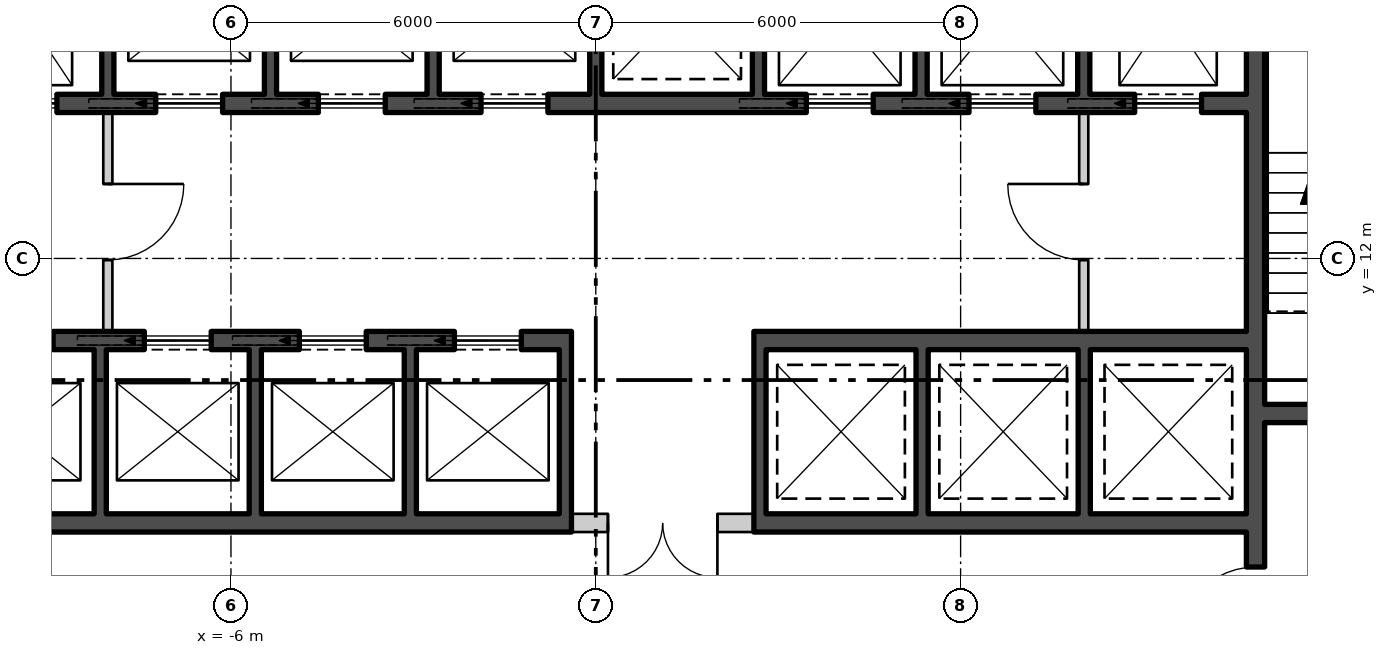
"""IFC4 building model, lengths in metres.
Left out: names, types, materials, properties, quantities, classifications, styles, units other than length and angle.
Written with IfcOpenShell. Run it as: python <this file> out.ifc"""

import sys

from ifc_helpers import new_model, si_unit, direction, frame, frame_2d, origin, place, context, subcontext, project, spatial, rectangle, extrude, element, fill, save


model = new_model("IFC4")
c1 = context("Model", 3, precision=1e-05, world=origin(), true_north=direction((0.0, 1.0)))
c2 = subcontext(c1, "Body", "Model", "MODEL_VIEW")
j1 = project(units=[si_unit("LENGTHUNIT", "METRE"), si_unit("PLANEANGLEUNIT", "RADIAN")], contexts=[c1])
p1 = place(None, origin())
s1 = spatial("IfcSite", under=j1, at=p1, CompositionType="ELEMENT")
p2 = place(p1, origin())
s2 = spatial("IfcBuilding", under=s1, at=p2, CompositionType="ELEMENT")
p3 = place(p2, frame((0.0, 0.0, 13.5)))
s3 = spatial("IfcBuildingStorey", under=s2, at=p3, CompositionType="ELEMENT", Elevation=13.5)
p4 = place(p3, frame((10.85, 0.6, 0.0), z_axis=(0.0, 0.0, 1.0), x_axis=(0.0, 1.0, 0.0)))
e1 = element("IfcWall", 1, at=p4, inside=s3, PredefinedType="SHEAR", context=c2, shape_type="SweptSolid", body=[
    extrude(rectangle(XDim=16.8, YDim=0.3, at=frame_2d((8.4, 0.0))), origin(), (0.0, 0.0, 1.0), 4.88),
])
p5 = place(p4, frame((5.075, 0.0, 0.0)))
e2 = element("IfcOpeningElement", 2, at=p5, cuts=e1, PredefinedType="OPENING", context=c2, shape_type="SweptSolid", body=[
    extrude(rectangle(XDim=1.25, YDim=2.1, at=frame_2d((0.625, 1.05))), frame((0.0, 0.16, 0.0), z_axis=(0.0, -1.0, 0.0), x_axis=(1.0, 0.0, 0.0)), (0.0, 0.0, 1.0), 0.32),
])
p6 = place(p4, frame((1.525, 0.0, 0.0)))
e3 = element("IfcOpeningElement", 3, at=p6, cuts=e1, PredefinedType="OPENING", context=c2, shape_type="SweptSolid", body=[
    extrude(rectangle(XDim=1.0, YDim=2.1, at=frame_2d((0.5, 1.05))), frame((0.0, 0.16, 0.0), z_axis=(0.0, -1.0, 0.0), x_axis=(1.0, 0.0, 0.0)), (0.0, 0.0, 1.0), 0.32),
])
p7 = place(p3, frame((11.0, 9.45, 0.0), z_axis=(0.0, 0.0, 1.0), x_axis=(1.0, 0.0, 0.0)))
e4 = element("IfcWall", 4, at=p7, inside=s3, PredefinedType="SHEAR", context=c2, shape_type="SweptSolid", body=[
    extrude(rectangle(XDim=3.2, YDim=0.3, at=frame_2d((1.6, 0.0))), origin(), (0.0, 0.0, 1.0), 4.88),
])
p8 = place(p7, frame((1.0, 0.0, 0.0)))
e5 = element("IfcOpeningElement", 5, at=p8, cuts=e4, PredefinedType="OPENING", context=c2, shape_type="SweptSolid", body=[
    extrude(rectangle(XDim=1.2, YDim=2.1, at=frame_2d((0.6, 1.05))), frame((0.0, 0.16, 0.0), z_axis=(0.0, -1.0, 0.0), x_axis=(1.0, 0.0, 0.0)), (0.0, 0.0, 1.0), 0.32),
])
p9 = place(p3, frame((-10.7, 14.55, 0.0), z_axis=(0.0, 0.0, 1.0), x_axis=(1.0, 0.0, 0.0)))
e6 = element("IfcWall", 6, at=p9, inside=s3, PredefinedType="SHEAR", context=c2, shape_type="SweptSolid", body=[
    extrude(rectangle(XDim=21.4, YDim=0.3, at=frame_2d((10.7, 0.0))), origin(), (0.0, 0.0, 1.0), 4.88),
])
p10 = place(p9, frame((0.738, 0.0, 0.0)))
e7 = element("IfcOpeningElement", 7, at=p10, cuts=e6, PredefinedType="OPENING", context=c2, shape_type="SweptSolid", body=[
    extrude(rectangle(XDim=1.1, YDim=2.1, at=frame_2d((0.55, 1.05))), frame((0.0, 0.16, 0.0), z_axis=(0.0, -1.0, 0.0), x_axis=(1.0, 0.0, 0.0)), (0.0, 0.0, 1.0), 0.32),
])
p11 = place(p9, frame((3.462, 0.0, 0.0)))
e8 = element("IfcOpeningElement", 8, at=p11, cuts=e6, PredefinedType="OPENING", context=c2, shape_type="SweptSolid", body=[
    extrude(rectangle(XDim=1.1, YDim=2.1, at=frame_2d((0.55, 1.05))), frame((0.0, 0.16, 0.0), z_axis=(0.0, -1.0, 0.0), x_axis=(1.0, 0.0, 0.0)), (0.0, 0.0, 1.0), 0.32),
])
p12 = place(p9, frame((6.138, 0.0, 0.0)))
e9 = element("IfcOpeningElement", 9, at=p12, cuts=e6, PredefinedType="OPENING", context=c2, shape_type="SweptSolid", body=[
    extrude(rectangle(XDim=1.1, YDim=2.1, at=frame_2d((0.55, 1.05))), frame((0.0, 0.16, 0.0), z_axis=(0.0, -1.0, 0.0), x_axis=(1.0, 0.0, 0.0)), (0.0, 0.0, 1.0), 0.32),
])
p13 = place(p9, frame((8.812, 0.0, 0.0)))
e10 = element("IfcOpeningElement", 10, at=p13, cuts=e6, PredefinedType="OPENING", context=c2, shape_type="SweptSolid", body=[
    extrude(rectangle(XDim=1.1, YDim=2.1, at=frame_2d((0.55, 1.05))), frame((0.0, 0.16, 0.0), z_axis=(0.0, -1.0, 0.0), x_axis=(1.0, 0.0, 0.0)), (0.0, 0.0, 1.0), 0.32),
])
p14 = place(p9, frame((14.162, 0.0, 0.0)))
e11 = element("IfcOpeningElement", 11, at=p14, cuts=e6, PredefinedType="OPENING", context=c2, shape_type="SweptSolid", body=[
    extrude(rectangle(XDim=1.1, YDim=2.1, at=frame_2d((0.55, 1.05))), frame((0.0, 0.16, 0.0), z_axis=(0.0, -1.0, 0.0), x_axis=(1.0, 0.0, 0.0)), (0.0, 0.0, 1.0), 0.32),
])
p15 = place(p9, frame((16.837, 0.0, 0.0)))
e12 = element("IfcOpeningElement", 12, at=p15, cuts=e6, PredefinedType="OPENING", context=c2, shape_type="SweptSolid", body=[
    extrude(rectangle(XDim=1.1, YDim=2.1, at=frame_2d((0.55, 1.05))), frame((0.0, 0.16, 0.0), z_axis=(0.0, -1.0, 0.0), x_axis=(1.0, 0.0, 0.0)), (0.0, 0.0, 1.0), 0.32),
])
p16 = place(p9, frame((19.562, 0.0, 0.0)))
e13 = element("IfcOpeningElement", 13, at=p16, cuts=e6, PredefinedType="OPENING", context=c2, shape_type="SweptSolid", body=[
    extrude(rectangle(XDim=1.1, YDim=2.1, at=frame_2d((0.55, 1.05))), frame((0.0, 0.16, 0.0), z_axis=(0.0, -1.0, 0.0), x_axis=(1.0, 0.0, 0.0)), (0.0, 0.0, 1.0), 0.32),
])
p17 = place(p3, frame((-10.7, 10.65, 0.0), z_axis=(0.0, 0.0, 1.0), x_axis=(1.0, 0.0, 0.0)))
e14 = element("IfcWall", 14, at=p17, inside=s3, PredefinedType="SHEAR", context=c2, shape_type="SweptSolid", body=[
    extrude(rectangle(XDim=10.3, YDim=0.3, at=frame_2d((5.15, 0.0))), origin(), (0.0, 0.0, 1.0), 4.88),
])
p18 = place(p17, frame((0.675, 0.0, 0.0)))
e15 = element("IfcOpeningElement", 15, at=p18, cuts=e14, PredefinedType="OPENING", context=c2, shape_type="SweptSolid", body=[
    extrude(rectangle(XDim=1.1, YDim=2.1, at=frame_2d((0.55, 1.05))), frame((0.0, 0.16, 0.0), z_axis=(0.0, -1.0, 0.0), x_axis=(1.0, 0.0, 0.0)), (0.0, 0.0, 1.0), 0.32),
])
p19 = place(p17, frame((3.275, 0.0, 0.0)))
e16 = element("IfcOpeningElement", 16, at=p19, cuts=e14, PredefinedType="OPENING", context=c2, shape_type="SweptSolid", body=[
    extrude(rectangle(XDim=1.1, YDim=2.1, at=frame_2d((0.55, 1.05))), frame((0.0, 0.16, 0.0), z_axis=(0.0, -1.0, 0.0), x_axis=(1.0, 0.0, 0.0)), (0.0, 0.0, 1.0), 0.32),
])
p20 = place(p17, frame((5.825, 0.0, 0.0)))
e17 = element("IfcOpeningElement", 17, at=p20, cuts=e14, PredefinedType="OPENING", context=c2, shape_type="SweptSolid", body=[
    extrude(rectangle(XDim=1.1, YDim=2.1, at=frame_2d((0.55, 1.05))), frame((0.0, 0.16, 0.0), z_axis=(0.0, -1.0, 0.0), x_axis=(1.0, 0.0, 0.0)), (0.0, 0.0, 1.0), 0.32),
])
p21 = place(p17, frame((8.375, 0.0, 0.0)))
e18 = element("IfcOpeningElement", 18, at=p21, cuts=e14, PredefinedType="OPENING", context=c2, shape_type="SweptSolid", body=[
    extrude(rectangle(XDim=1.1, YDim=2.1, at=frame_2d((0.55, 1.05))), frame((0.0, 0.16, 0.0), z_axis=(0.0, -1.0, 0.0), x_axis=(1.0, 0.0, 0.0)), (0.0, 0.0, 1.0), 0.32),
])
p22 = place(p3, frame((-10.7, 7.65, 0.0), z_axis=(0.0, 0.0, 1.0), x_axis=(1.0, 0.0, 0.0)))
e19 = element("IfcWall", 19, at=p22, inside=s3, PredefinedType="SHEAR", context=c2, shape_type="SweptSolid", body=[
    extrude(rectangle(XDim=10.3, YDim=0.3, at=frame_2d((5.15, 0.0))), origin(), (0.0, 0.0, 1.0), 4.88),
])
for number, where, z_axis, x_axis in (
    (20, (2.6, 10.65, 0.0), (0.0, 0.0, 1.0), (1.0, 0.0, 0.0)),
    (21, (2.6, 7.65, 0.0), (0.0, 0.0, 1.0), (1.0, 0.0, 0.0)),
):
    element("IfcWall", number, at=place(p3, frame(where, z_axis=z_axis, x_axis=x_axis)), inside=s3, PredefinedType="SHEAR", context=c2, shape_type="SweptSolid", body=[
        extrude(rectangle(XDim=8.1, YDim=0.3, at=frame_2d((4.05, 0.0))), origin(), (0.0, 0.0, 1.0), 4.88),
    ])
for number, where, z_axis, x_axis in (
    (22, (-8.025, 14.7, 0.0), (0.0, 0.0, 1.0), (0.0, 1.0, 0.0)),
    (23, (-5.35, 14.7, 0.0), (0.0, 0.0, 1.0), (0.0, 1.0, 0.0)),
    (24, (-2.675, 14.7, 0.0), (0.0, 0.0, 1.0), (0.0, 1.0, 0.0)),
    (25, (0.0, 14.7, 0.0), (0.0, 0.0, 1.0), (0.0, 1.0, 0.0)),
    (26, (2.675, 14.7, 0.0), (0.0, 0.0, 1.0), (0.0, 1.0, 0.0)),
    (27, (5.35, 14.7, 0.0), (0.0, 0.0, 1.0), (0.0, 1.0, 0.0)),
    (28, (8.025, 14.7, 0.0), (0.0, 0.0, 1.0), (0.0, 1.0, 0.0)),
    (29, (-8.15, 7.8, 0.0), (0.0, 0.0, 1.0), (0.0, 1.0, 0.0)),
    (30, (-5.6, 7.8, 0.0), (0.0, 0.0, 1.0), (0.0, 1.0, 0.0)),
    (31, (-3.05, 7.8, 0.0), (0.0, 0.0, 1.0), (0.0, 1.0, 0.0)),
    (32, (-0.5, 7.8, 0.0), (0.0, 0.0, 1.0), (0.0, 1.0, 0.0)),
    (33, (2.7, 7.8, 0.0), (0.0, 0.0, 1.0), (0.0, 1.0, 0.0)),
    (34, (5.367, 7.8, 0.0), (0.0, 0.0, 1.0), (0.0, 1.0, 0.0)),
    (35, (8.033, 7.8, 0.0), (0.0, 0.0, 1.0), (0.0, 1.0, 0.0)),
):
    element("IfcWall", number, at=place(p3, frame(where, z_axis=z_axis, x_axis=x_axis)), inside=s3, PredefinedType="SHEAR", context=c2, shape_type="SweptSolid", body=[
        extrude(rectangle(XDim=2.7, YDim=0.2, at=frame_2d((1.35, 0.0))), origin(), (0.0, 0.0, 1.0), 4.88),
    ])
p23 = place(p3, frame((-8.025, 10.8, 0.0), z_axis=(0.0, 0.0, 1.0), x_axis=(0.0, 1.0, 0.0)))
e36 = element("IfcWall", 36, at=p23, inside=s3, PredefinedType="PARTITIONING", context=c2, shape_type="SweptSolid", body=[
    extrude(rectangle(XDim=3.6, YDim=0.15, at=frame_2d((1.8, 0.0))), origin(), (0.0, 0.0, 1.0), 4.88),
])
p24 = place(p23, frame((1.175, 0.0, 0.0)))
e37 = element("IfcOpeningElement", 37, at=p24, cuts=e36, PredefinedType="OPENING", context=c2, shape_type="SweptSolid", body=[
    extrude(rectangle(XDim=1.25, YDim=2.1, at=frame_2d((0.625, 1.05))), frame((0.0, 0.085, 0.0), z_axis=(0.0, -1.0, 0.0), x_axis=(1.0, 0.0, 0.0)), (0.0, 0.0, 1.0), 0.17),
])
p25 = place(p3, frame((8.025, 10.8, 0.0), z_axis=(0.0, 0.0, 1.0), x_axis=(0.0, 1.0, 0.0)))
e38 = element("IfcWall", 38, at=p25, inside=s3, PredefinedType="PARTITIONING", context=c2, shape_type="SweptSolid", body=[
    extrude(rectangle(XDim=3.6, YDim=0.15, at=frame_2d((1.8, 0.0))), origin(), (0.0, 0.0, 1.0), 4.88),
])
p26 = place(p25, frame((1.175, 0.0, 0.0)))
e39 = element("IfcOpeningElement", 39, at=p26, cuts=e38, PredefinedType="OPENING", context=c2, shape_type="SweptSolid", body=[
    extrude(rectangle(XDim=1.25, YDim=2.1, at=frame_2d((0.625, 1.05))), frame((0.0, 0.085, 0.0), z_axis=(0.0, -1.0, 0.0), x_axis=(1.0, 0.0, 0.0)), (0.0, 0.0, 1.0), 0.17),
])
p27 = place(p3, frame((-0.4, 7.65, 0.0), z_axis=(0.0, 0.0, 1.0), x_axis=(1.0, 0.0, 0.0)))
e40 = element("IfcWall", 40, at=p27, inside=s3, PredefinedType="PARTITIONING", context=c2, shape_type="SweptSolid", body=[
    extrude(rectangle(XDim=3.0, YDim=0.3, at=frame_2d((1.5, 0.0))), origin(), (0.0, 0.0, 1.0), 4.88),
])
p28 = place(p27, frame((0.6, 0.0, 0.0)))
e41 = element("IfcOpeningElement", 41, at=p28, cuts=e40, PredefinedType="OPENING", context=c2, shape_type="SweptSolid", body=[
    extrude(rectangle(XDim=1.8, YDim=2.4, at=frame_2d((0.9, 1.2))), frame((0.0, 0.16, 0.0), z_axis=(0.0, -1.0, 0.0), x_axis=(1.0, 0.0, 0.0)), (0.0, 0.0, 1.0), 0.32),
])
p29 = place(p10, origin())
e42 = element("IfcDoor", 42, at=p29, inside=s3, OperationType="SLIDING_TO_LEFT", PredefinedType="DOOR", context=c2, shape_type="SweptSolid", body=[
    extrude(rectangle(XDim=1.1, YDim=2.1, at=frame_2d((0.55, 1.05))), frame((0.0, 0.025, 0.0), z_axis=(0.0, -1.0, 0.0), x_axis=(1.0, 0.0, 0.0)), (0.0, 0.0, 1.0), 0.05),
])
fill(e7, e42)
p30 = place(p11, origin())
e43 = element("IfcDoor", 43, at=p30, inside=s3, OperationType="SLIDING_TO_LEFT", PredefinedType="DOOR", context=c2, shape_type="SweptSolid", body=[
    extrude(rectangle(XDim=1.1, YDim=2.1, at=frame_2d((0.55, 1.05))), frame((0.0, 0.025, 0.0), z_axis=(0.0, -1.0, 0.0), x_axis=(1.0, 0.0, 0.0)), (0.0, 0.0, 1.0), 0.05),
])
fill(e8, e43)
p31 = place(p12, origin())
e44 = element("IfcDoor", 44, at=p31, inside=s3, OperationType="SLIDING_TO_LEFT", PredefinedType="DOOR", context=c2, shape_type="SweptSolid", body=[
    extrude(rectangle(XDim=1.1, YDim=2.1, at=frame_2d((0.55, 1.05))), frame((0.0, 0.025, 0.0), z_axis=(0.0, -1.0, 0.0), x_axis=(1.0, 0.0, 0.0)), (0.0, 0.0, 1.0), 0.05),
])
fill(e9, e44)
p32 = place(p13, origin())
e45 = element("IfcDoor", 45, at=p32, inside=s3, OperationType="SLIDING_TO_LEFT", PredefinedType="DOOR", context=c2, shape_type="SweptSolid", body=[
    extrude(rectangle(XDim=1.1, YDim=2.1, at=frame_2d((0.55, 1.05))), frame((0.0, 0.025, 0.0), z_axis=(0.0, -1.0, 0.0), x_axis=(1.0, 0.0, 0.0)), (0.0, 0.0, 1.0), 0.05),
])
fill(e10, e45)
p33 = place(p14, origin())
e46 = element("IfcDoor", 46, at=p33, inside=s3, OperationType="SLIDING_TO_LEFT", PredefinedType="DOOR", context=c2, shape_type="SweptSolid", body=[
    extrude(rectangle(XDim=1.1, YDim=2.1, at=frame_2d((0.55, 1.05))), frame((0.0, 0.025, 0.0), z_axis=(0.0, -1.0, 0.0), x_axis=(1.0, 0.0, 0.0)), (0.0, 0.0, 1.0), 0.05),
])
fill(e11, e46)
p34 = place(p15, origin())
e47 = element("IfcDoor", 47, at=p34, inside=s3, OperationType="SLIDING_TO_LEFT", PredefinedType="DOOR", context=c2, shape_type="SweptSolid", body=[
    extrude(rectangle(XDim=1.1, YDim=2.1, at=frame_2d((0.55, 1.05))), frame((0.0, 0.025, 0.0), z_axis=(0.0, -1.0, 0.0), x_axis=(1.0, 0.0, 0.0)), (0.0, 0.0, 1.0), 0.05),
])
fill(e12, e47)
p35 = place(p16, origin())
e48 = element("IfcDoor", 48, at=p35, inside=s3, OperationType="SLIDING_TO_LEFT", PredefinedType="DOOR", context=c2, shape_type="SweptSolid", body=[
    extrude(rectangle(XDim=1.1, YDim=2.1, at=frame_2d((0.55, 1.05))), frame((0.0, 0.025, 0.0), z_axis=(0.0, -1.0, 0.0), x_axis=(1.0, 0.0, 0.0)), (0.0, 0.0, 1.0), 0.05),
])
fill(e13, e48)
p36 = place(p18, origin())
e49 = element("IfcDoor", 49, at=p36, inside=s3, OperationType="SLIDING_TO_LEFT", PredefinedType="DOOR", context=c2, shape_type="SweptSolid", body=[
    extrude(rectangle(XDim=1.1, YDim=2.1, at=frame_2d((0.55, 1.05))), frame((0.0, 0.025, 0.0), z_axis=(0.0, -1.0, 0.0), x_axis=(1.0, 0.0, 0.0)), (0.0, 0.0, 1.0), 0.05),
])
fill(e15, e49)
p37 = place(p19, origin())
e50 = element("IfcDoor", 50, at=p37, inside=s3, OperationType="SLIDING_TO_LEFT", PredefinedType="DOOR", context=c2, shape_type="SweptSolid", body=[
    extrude(rectangle(XDim=1.1, YDim=2.1, at=frame_2d((0.55, 1.05))), frame((0.0, 0.025, 0.0), z_axis=(0.0, -1.0, 0.0), x_axis=(1.0, 0.0, 0.0)), (0.0, 0.0, 1.0), 0.05),
])
fill(e16, e50)
p38 = place(p20, origin())
e51 = element("IfcDoor", 51, at=p38, inside=s3, OperationType="SLIDING_TO_LEFT", PredefinedType="DOOR", context=c2, shape_type="SweptSolid", body=[
    extrude(rectangle(XDim=1.1, YDim=2.1, at=frame_2d((0.55, 1.05))), frame((0.0, 0.025, 0.0), z_axis=(0.0, -1.0, 0.0), x_axis=(1.0, 0.0, 0.0)), (0.0, 0.0, 1.0), 0.05),
])
fill(e17, e51)
p39 = place(p21, origin())
e52 = element("IfcDoor", 52, at=p39, inside=s3, OperationType="SLIDING_TO_LEFT", PredefinedType="DOOR", context=c2, shape_type="SweptSolid", body=[
    extrude(rectangle(XDim=1.1, YDim=2.1, at=frame_2d((0.55, 1.05))), frame((0.0, 0.025, 0.0), z_axis=(0.0, -1.0, 0.0), x_axis=(1.0, 0.0, 0.0)), (0.0, 0.0, 1.0), 0.05),
])
fill(e18, e52)
p40 = place(p24, origin())
e53 = element("IfcDoor", 53, at=p40, inside=s3, OperationType="SINGLE_SWING_RIGHT", PredefinedType="DOOR", context=c2, shape_type="SweptSolid", body=[
    extrude(rectangle(XDim=1.25, YDim=2.1, at=frame_2d((0.625, 1.05))), frame((0.0, 0.025, 0.0), z_axis=(0.0, -1.0, 0.0), x_axis=(1.0, 0.0, 0.0)), (0.0, 0.0, 1.0), 0.05),
])
fill(e37, e53)
p41 = place(p26, origin())
e54 = element("IfcDoor", 54, at=p41, inside=s3, OperationType="SINGLE_SWING_LEFT", PredefinedType="DOOR", context=c2, shape_type="SweptSolid", body=[
    extrude(rectangle(XDim=1.25, YDim=2.1, at=frame_2d((0.625, 1.05))), frame((0.0, 0.025, 0.0), z_axis=(0.0, -1.0, 0.0), x_axis=(1.0, 0.0, 0.0)), (0.0, 0.0, 1.0), 0.05),
])
fill(e39, e54)
p42 = place(p5, origin())
e55 = element("IfcDoor", 55, at=p42, inside=s3, OperationType="SINGLE_SWING_RIGHT", PredefinedType="DOOR", context=c2, shape_type="SweptSolid", body=[
    extrude(rectangle(XDim=1.25, YDim=2.1, at=frame_2d((0.625, 1.05))), frame((0.0, 0.025, 0.0), z_axis=(0.0, -1.0, 0.0), x_axis=(1.0, 0.0, 0.0)), (0.0, 0.0, 1.0), 0.05),
])
fill(e2, e55)
p43 = place(p28, origin())
e56 = element("IfcDoor", 56, at=p43, inside=s3, OperationType="DOUBLE_DOOR_SINGLE_SWING", PredefinedType="DOOR", context=c2, shape_type="SweptSolid", body=[
    extrude(rectangle(XDim=1.8, YDim=2.4, at=frame_2d((0.9, 1.2))), frame((0.0, 0.025, 0.0), z_axis=(0.0, -1.0, 0.0), x_axis=(1.0, 0.0, 0.0)), (0.0, 0.0, 1.0), 0.05),
])
fill(e41, e56)
save(model, sys.argv[1])
